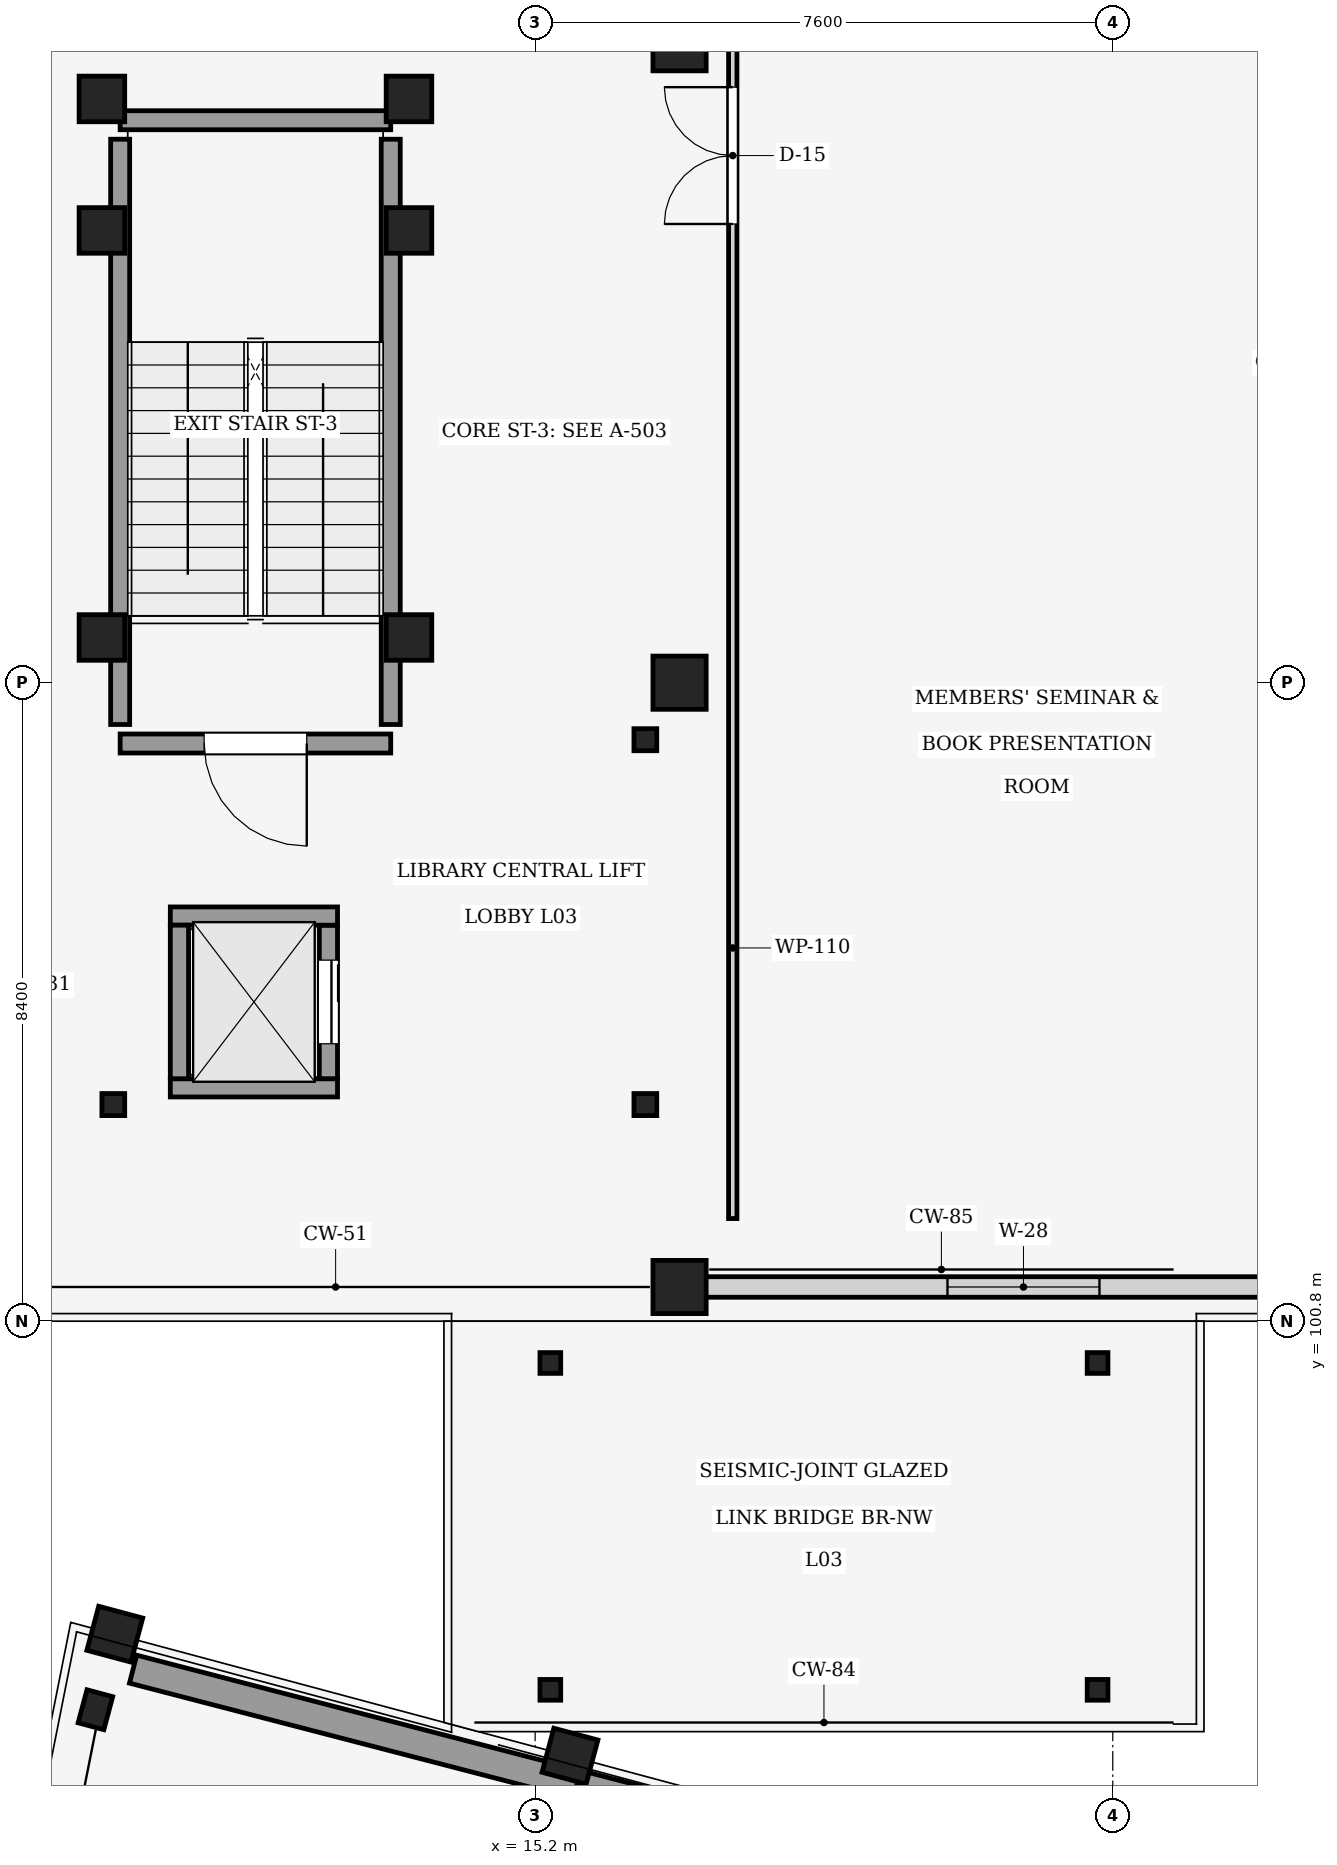
"""IFC4 building model, lengths in metres.
Left out: names, types, materials, properties, quantities, classifications, styles, units other than length and angle.
Written with IfcOpenShell. Run it as: python <this file> out.ifc"""

import sys

from ifc_helpers import new_model, si_unit, direction, frame, frame_2d, origin, origin_2d, place, context, subcontext, project, spatial, rectangle, hollow_circle, i_section, extrude, element, fill, save


model = new_model("IFC4")
c1 = context("Model", 3, precision=1e-05, world=origin(), true_north=direction((0.0, 1.0)))
c2 = subcontext(c1, "Body", "Model", "MODEL_VIEW")
j1 = project(units=[si_unit("LENGTHUNIT", "METRE"), si_unit("PLANEANGLEUNIT", "RADIAN")], contexts=[c1])
p1 = place(None, origin())
s1 = spatial("IfcSite", under=j1, at=p1, CompositionType="ELEMENT")
p2 = place(p1, origin())
s2 = spatial("IfcBuilding", under=s1, at=p2, CompositionType="ELEMENT")
p3 = place(p2, frame((0.0, 0.0, 13.2)))
s3 = spatial("IfcBuildingStorey", under=s2, at=p3, CompositionType="ELEMENT", Elevation=13.2)
for number, where, z_axis, x_axis in (
    (1, (15.658, 95.077, 0.0), (0.0, 0.0, 1.0), (-0.966, 0.259, 0.0)),
    (2, (9.67, 96.682, 0.0), (0.0, 0.0, 1.0), (-0.966, 0.259, 0.0)),
):
    element("IfcColumn", number, at=place(p3, frame(where, z_axis=z_axis, x_axis=x_axis)), inside=s3, PredefinedType="COLUMN", context=c2, shape_type="SweptSolid", body=[
        extrude(rectangle(XDim=0.6, YDim=0.6, at=origin_2d()), origin(), (0.0, 0.0, 1.0), 4.05),
    ])
p4 = place(p3, frame((9.414, 95.688, 0.0), z_axis=(0.0, 0.0, 1.0), x_axis=(-0.965925826289, 0.258819045103, 0.0)))
e3 = element("IfcColumn", 3, at=p4, inside=s3, PredefinedType="PILASTER", context=c2, shape_type="SweptSolid", body=[
    extrude(rectangle(XDim=0.35, YDim=0.45, at=origin_2d()), origin(), (0.0, 0.0, 1.0), 4.05),
])
for number, where, z_axis, x_axis in (
    (4, (17.1, 101.25, 0.0), (0.0, 0.0, 1.0), (1.0, 0.0, 0.0)),
    (5, (17.1, 109.2, 0.0), (0.0, 0.0, 1.0), (1.0, 0.0, 0.0)),
    (6, (17.1, 117.6, 0.0), (0.0, 0.0, 1.0), (1.0, 0.0, 0.0)),
):
    element("IfcColumn", number, at=place(p3, frame(where, z_axis=z_axis, x_axis=x_axis)), inside=s3, PredefinedType="COLUMN", context=c2, shape_type="SweptSolid", body=[
        extrude(rectangle(XDim=0.7, YDim=0.7, at=origin_2d()), origin(), (0.0, 0.0, 1.0), 4.05),
    ])
for number, where, z_axis, x_axis in (
    (7, (15.4, 95.95, 0.0), (0.0, 0.0, 1.0), (1.0, 0.0, 0.0)),
    (8, (22.6, 95.95, 0.0), (0.0, 0.0, 1.0), (1.0, 0.0, 0.0)),
    (9, (22.6, 100.25, 0.0), (0.0, 0.0, 1.0), (1.0, 0.0, 0.0)),
    (10, (15.4, 100.25, 0.0), (0.0, 0.0, 1.0), (1.0, 0.0, 0.0)),
):
    element("IfcColumn", number, at=place(p3, frame(where, z_axis=z_axis, x_axis=x_axis)), inside=s3, PredefinedType="COLUMN", context=c2, shape_type="SweptSolid", body=[
        extrude(hollow_circle(Radius=0.136, WallThickness=0.016, at=origin_2d()), origin(), (0.0, 0.0, 1.0), 3.82),
    ])
for number, where, z_axis, x_axis in (
    (11, (13.54, 109.795, 0.0), (0.0, 0.0, 1.0), (1.0, 0.0, 0.0)),
    (12, (9.5, 109.795, 0.0), (0.0, 0.0, 1.0), (1.0, 0.0, 0.0)),
    (13, (13.54, 115.15, 0.0), (0.0, 0.0, 1.0), (1.0, 0.0, 0.0)),
    (14, (9.5, 115.15, 0.0), (0.0, 0.0, 1.0), (1.0, 0.0, 0.0)),
    (15, (13.54, 116.88, 0.0), (0.0, 0.0, 1.0), (1.0, 0.0, 0.0)),
    (16, (9.5, 116.88, 0.0), (0.0, 0.0, 1.0), (1.0, 0.0, 0.0)),
):
    element("IfcColumn", number, at=place(p3, frame(where, z_axis=z_axis, x_axis=x_axis)), inside=s3, PredefinedType="COLUMN", context=c2, shape_type="SweptSolid", body=[
        extrude(rectangle(XDim=0.6, YDim=0.6, at=origin_2d()), origin(), (0.0, 0.0, 1.0), 4.05),
    ])
for number, where, z_axis, x_axis in (
    (17, (9.65, 103.65, 0.0), (0.0, 0.0, 1.0), (1.0, 0.0, 0.0)),
    (18, (16.65, 103.65, 0.0), (0.0, 0.0, 1.0), (1.0, 0.0, 0.0)),
    (19, (16.65, 108.45, 0.0), (0.0, 0.0, 1.0), (1.0, 0.0, 0.0)),
):
    element("IfcColumn", number, at=place(p3, frame(where, z_axis=z_axis, x_axis=x_axis)), inside=s3, PredefinedType="COLUMN", context=c2, shape_type="SweptSolid", body=[
        extrude(i_section(OverallWidth=0.3, OverallDepth=0.29, WebThickness=0.009, FlangeThickness=0.014, at=origin_2d()), origin(), (0.0, 0.0, 1.0), 4.05),
    ])
p5 = place(p3, frame((9.91, 96.222, 0.0), z_axis=(0.0, 0.0, 1.0), x_axis=(0.96792914822, -0.251223334956, 0.0)))
e20 = element("IfcWall", 20, at=p5, inside=s3, PredefinedType="SHEAR", context=c2, shape_type="SweptSolid", body=[
    extrude(rectangle(XDim=12.1, YDim=0.38, at=frame_2d((6.05, 0.0))), origin(), (0.0, 0.0, 1.0), 3.75),
])
p6 = place(p3, frame((25.865, 101.25, 0.0), z_axis=(0.0, 0.0, 1.0), x_axis=(-1.0, 0.0, 0.0)))
e21 = element("IfcWall", 21, at=p6, inside=s3, PredefinedType="STANDARD", context=c2, shape_type="SweptSolid", body=[
    extrude(rectangle(XDim=8.48, YDim=0.27, at=frame_2d((4.24, 0.0))), origin(), (0.0, 0.0, 1.0), 3.015),
])
p7 = place(p6, frame((3.24, 0.0, 0.85)))
e22 = element("IfcOpeningElement", 22, at=p7, cuts=e21, PredefinedType="OPENING", context=c2, shape_type="SweptSolid", body=[
    extrude(rectangle(XDim=2.0, YDim=1.85, at=frame_2d((1.0, 0.925))), frame((0.0, 0.145, 0.0), z_axis=(0.0, -1.0, 0.0), x_axis=(1.0, 0.0, 0.0)), (0.0, 0.0, 1.0), 0.29),
])
p8 = place(p3, frame((13.3, 108.4, 0.0), z_axis=(0.0, 0.0, 1.0), x_axis=(-1.0, 0.0, 0.0)))
e23 = element("IfcWall", 23, at=p8, inside=s3, PredefinedType="SHEAR", context=c2, shape_type="SweptSolid", body=[
    extrude(rectangle(XDim=3.56, YDim=0.25, at=frame_2d((1.78, 0.0))), origin(), (0.0, 0.0, 1.0), 4.05),
])
p9 = place(p8, frame((1.105, 0.0, 0.0)))
e24 = element("IfcOpeningElement", 24, at=p9, cuts=e23, PredefinedType="OPENING", context=c2, shape_type="SweptSolid", body=[
    extrude(rectangle(XDim=1.35, YDim=2.2, at=frame_2d((0.675, 1.1))), frame((0.0, 0.135, 0.0), z_axis=(0.0, -1.0, 0.0), x_axis=(1.0, 0.0, 0.0)), (0.0, 0.0, 1.0), 0.27),
])
p10 = place(p3, frame((9.74, 108.65, 0.0), z_axis=(0.0, 0.0, 1.0), x_axis=(0.0, 1.0, 0.0)))
e25 = element("IfcWall", 25, at=p10, inside=s3, PredefinedType="SHEAR", context=c2, shape_type="SweptSolid", body=[
    extrude(rectangle(XDim=7.7, YDim=0.25, at=frame_2d((3.85, 0.0))), origin(), (0.0, 0.0, 1.0), 4.05),
])
p11 = place(p3, frame((9.74, 116.6, 0.0), z_axis=(0.0, 0.0, 1.0), x_axis=(1.0, 0.0, 0.0)))
e26 = element("IfcWall", 26, at=p11, inside=s3, PredefinedType="SHEAR", context=c2, shape_type="SweptSolid", body=[
    extrude(rectangle(XDim=3.56, YDim=0.25, at=frame_2d((1.78, 0.0))), origin(), (0.0, 0.0, 1.0), 4.05),
])
p12 = place(p3, frame((13.3, 116.35, 0.0), z_axis=(0.0, 0.0, 1.0), x_axis=(0.0, -1.0, 0.0)))
e27 = element("IfcWall", 27, at=p12, inside=s3, PredefinedType="SHEAR", context=c2, shape_type="SweptSolid", body=[
    extrude(rectangle(XDim=7.7, YDim=0.25, at=frame_2d((3.85, 0.0))), origin(), (0.0, 0.0, 1.0), 4.05),
])
p13 = place(p3, frame((12.6, 103.87, 0.0), z_axis=(0.0, 0.0, 1.0), x_axis=(-1.0, 0.0, 0.0)))
e28 = element("IfcWall", 28, at=p13, inside=s3, PredefinedType="SHEAR", context=c2, shape_type="SweptSolid", body=[
    extrude(rectangle(XDim=2.2, YDim=0.24, at=frame_2d((1.1, 0.0))), origin(), (0.0, 0.0, 1.0), 4.05),
])
p14 = place(p3, frame((12.48, 106.01, 0.0), z_axis=(0.0, 0.0, 1.0), x_axis=(0.0, -1.0, 0.0)))
e29 = element("IfcWall", 29, at=p14, inside=s3, PredefinedType="SHEAR", context=c2, shape_type="SweptSolid", body=[
    extrude(rectangle(XDim=2.02, YDim=0.24, at=frame_2d((1.01, 0.0))), origin(), (0.0, 0.0, 1.0), 4.05),
])
p15 = place(p14, frame((0.46, 0.0, 0.0)))
e30 = element("IfcOpeningElement", 30, at=p15, cuts=e29, PredefinedType="OPENING", context=c2, shape_type="SweptSolid", body=[
    extrude(rectangle(XDim=1.1, YDim=2.15, at=frame_2d((0.55, 1.075))), frame((0.0, 0.13, 0.0), z_axis=(0.0, -1.0, 0.0), x_axis=(1.0, 0.0, 0.0)), (0.0, 0.0, 1.0), 0.26),
])
p16 = place(p3, frame((10.4, 106.13, 0.0), z_axis=(0.0, 0.0, 1.0), x_axis=(1.0, 0.0, 0.0)))
e31 = element("IfcWall", 31, at=p16, inside=s3, PredefinedType="SHEAR", context=c2, shape_type="SweptSolid", body=[
    extrude(rectangle(XDim=2.2, YDim=0.24, at=frame_2d((1.1, 0.0))), origin(), (0.0, 0.0, 1.0), 4.05),
])
p17 = place(p3, frame((10.52, 103.99, 0.0), z_axis=(0.0, 0.0, 1.0), x_axis=(0.0, 1.0, 0.0)))
e32 = element("IfcWall", 32, at=p17, inside=s3, PredefinedType="SHEAR", context=c2, shape_type="SweptSolid", body=[
    extrude(rectangle(XDim=2.02, YDim=0.24, at=frame_2d((1.01, 0.0))), origin(), (0.0, 0.0, 1.0), 4.05),
])
p18 = place(p3, frame((17.8, 102.15, 0.0), z_axis=(0.0, 0.0, 1.0), x_axis=(0.0, 1.0, 0.0)))
e33 = element("IfcWall", 33, at=p18, inside=s3, PredefinedType="PARTITIONING", context=c2, shape_type="SweptSolid", body=[
    extrude(rectangle(XDim=29.67, YDim=0.11, at=frame_2d((14.835, 0.0))), origin(), (0.0, 0.0, 1.0), 3.015),
])
p19 = place(p18, frame((13.085, 0.0, 0.0)))
e34 = element("IfcOpeningElement", 34, at=p19, cuts=e33, PredefinedType="OPENING", context=c2, shape_type="SweptSolid", body=[
    extrude(rectangle(XDim=1.8, YDim=2.22, at=frame_2d((0.9, 1.11))), frame((0.0, 0.065, 0.0), z_axis=(0.0, -1.0, 0.0), x_axis=(1.0, 0.0, 0.0)), (0.0, 0.0, 1.0), 0.13),
])
p20 = place(p7, origin())
e35 = element("IfcWindow", 35, at=p20, inside=s3, PartitioningType="SINGLE_PANEL", PredefinedType="WINDOW", context=c2, shape_type="SweptSolid", body=[
    extrude(rectangle(XDim=2.0, YDim=1.85, at=frame_2d((1.0, 0.925))), frame((0.0, 0.03, 0.0), z_axis=(0.0, -1.0, 0.0), x_axis=(1.0, 0.0, 0.0)), (0.0, 0.0, 1.0), 0.06),
])
fill(e22, e35)
p21 = place(p9, origin())
e36 = element("IfcDoor", 36, at=p21, inside=s3, OperationType="SINGLE_SWING_LEFT", PredefinedType="DOOR", context=c2, shape_type="SweptSolid", body=[
    extrude(rectangle(XDim=1.35, YDim=2.2, at=frame_2d((0.675, 1.1))), frame((0.0, 0.025, 0.0), z_axis=(0.0, -1.0, 0.0), x_axis=(1.0, 0.0, 0.0)), (0.0, 0.0, 1.0), 0.05),
])
fill(e24, e36)
p22 = place(p15, origin())
e37 = element("IfcDoor", 37, at=p22, inside=s3, OperationType="SLIDING_TO_LEFT", PredefinedType="DOOR", context=c2, shape_type="SweptSolid", body=[
    extrude(rectangle(XDim=1.1, YDim=2.15, at=frame_2d((0.55, 1.075))), frame((0.0, 0.025, 0.0), z_axis=(0.0, -1.0, 0.0), x_axis=(1.0, 0.0, 0.0)), (0.0, 0.0, 1.0), 0.05),
])
fill(e30, e37)
p23 = place(p19, origin())
e38 = element("IfcDoor", 38, at=p23, inside=s3, OperationType="DOUBLE_DOOR_SINGLE_SWING", PredefinedType="DOOR", context=c2, shape_type="SweptSolid", body=[
    extrude(rectangle(XDim=1.8, YDim=2.22, at=frame_2d((0.9, 1.11))), frame((0.0, 0.025, 0.0), z_axis=(0.0, -1.0, 0.0), x_axis=(1.0, 0.0, 0.0)), (0.0, 0.0, 1.0), 0.05),
])
fill(e34, e38)
save(model, sys.argv[1])
